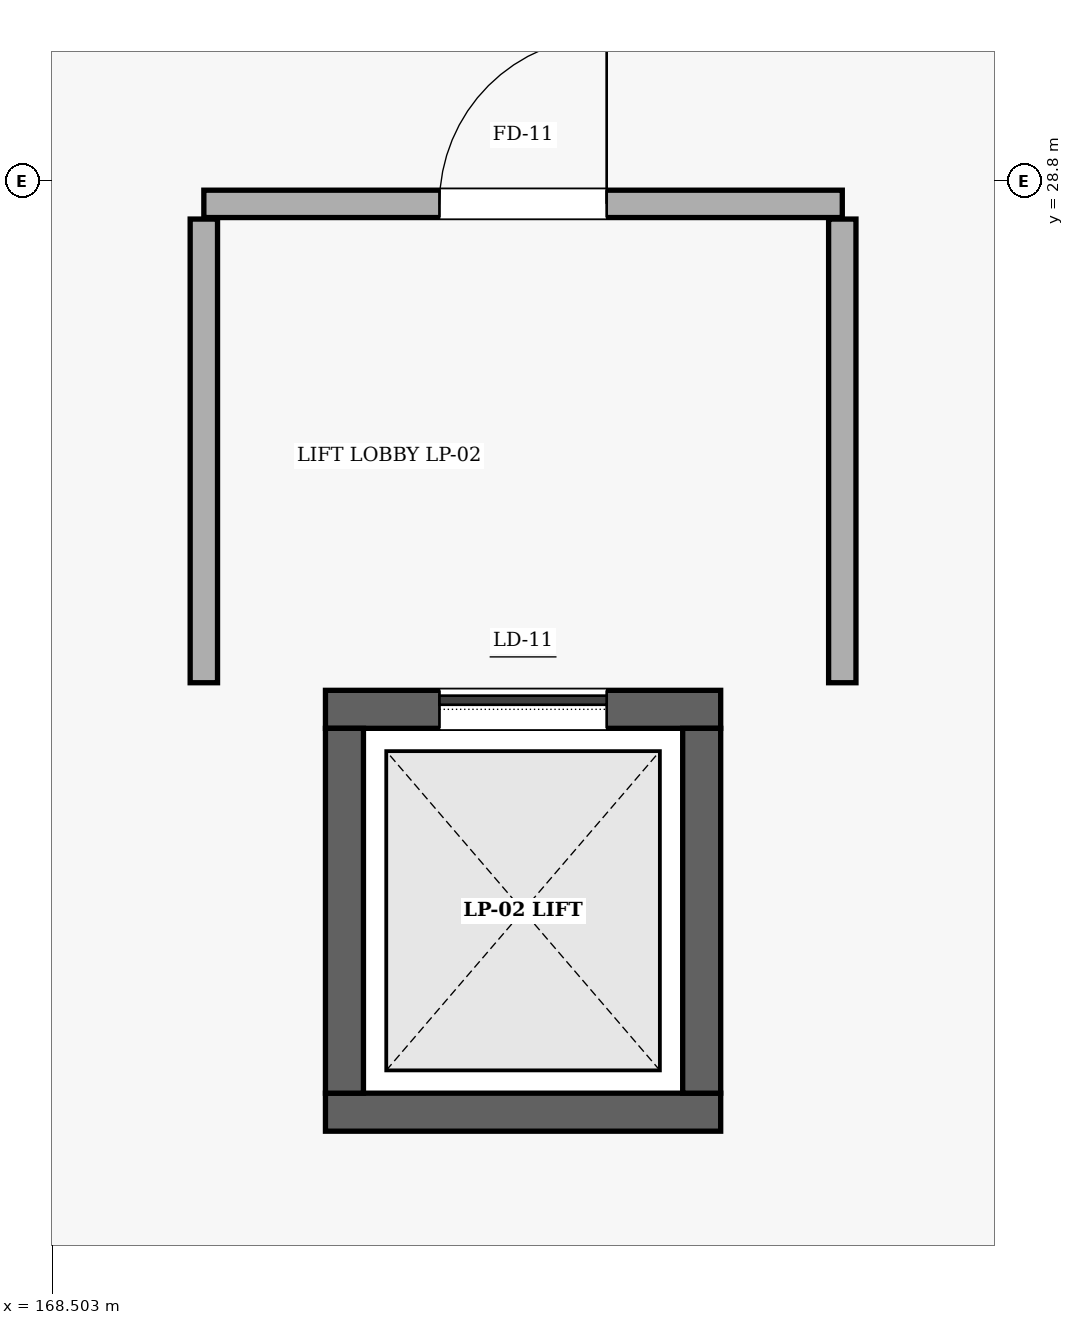
"""IFC4 building model, lengths in metres.
Left out: names, types, materials, properties, quantities, classifications, styles, units other than length and angle.
Written with IfcOpenShell. Run it as: python <this file> out.ifc"""

import sys

from ifc_helpers import new_model, si_unit, direction, frame, frame_2d, origin, place, context, subcontext, project, spatial, rectangle, extrude, element, fill, save


model = new_model("IFC4")
c1 = context("Model", 3, precision=1e-05, world=origin(), true_north=direction((0.0, 1.0)))
c2 = subcontext(c1, "Body", "Model", "MODEL_VIEW")
j1 = project(units=[si_unit("LENGTHUNIT", "METRE"), si_unit("PLANEANGLEUNIT", "RADIAN")], contexts=[c1])
p1 = place(None, origin())
s1 = spatial("IfcSite", under=j1, at=p1, CompositionType="ELEMENT")
p2 = place(p1, origin())
s2 = spatial("IfcBuilding", under=s1, at=p2, CompositionType="ELEMENT")
p3 = place(p2, origin())
s3 = spatial("IfcBuildingStorey", under=s2, at=p3, CompositionType="ELEMENT", Elevation=0.0)
p4 = place(p3, frame((170.3, 22.675, 0.0), z_axis=(0.0, 0.0, 1.0), x_axis=(1.0, 0.0, 0.0)))
e1 = element("IfcWall", 1, at=p4, inside=s3, PredefinedType="SHEAR", context=c2, shape_type="SweptSolid", body=[
    extrude(rectangle(XDim=2.6, YDim=0.25, at=frame_2d((1.3, 0.0))), origin(), (0.0, 0.0, 1.0), 5.12),
])
p5 = place(p3, frame((170.3, 25.325, 0.0), z_axis=(0.0, 0.0, 1.0), x_axis=(1.0, 0.0, 0.0)))
e2 = element("IfcWall", 2, at=p5, inside=s3, PredefinedType="SHEAR", context=c2, shape_type="SweptSolid", body=[
    extrude(rectangle(XDim=2.6, YDim=0.25, at=frame_2d((1.3, 0.0))), origin(), (0.0, 0.0, 1.0), 5.12),
])
p6 = place(p5, frame((0.75, 0.0, 0.0)))
e3 = element("IfcOpeningElement", 3, at=p6, cuts=e2, PredefinedType="OPENING", context=c2, shape_type="SweptSolid", body=[
    extrude(rectangle(XDim=1.1, YDim=2.15, at=frame_2d((0.55, 1.075))), frame((0.0, 0.135, 0.0), z_axis=(0.0, -1.0, 0.0), x_axis=(1.0, 0.0, 0.0)), (0.0, 0.0, 1.0), 0.27),
])
for number, where, z_axis, x_axis in (
    (4, (170.425, 22.8, 0.0), (0.0, 0.0, 1.0), (0.0, 1.0, 0.0)),
    (5, (172.775, 22.8, 0.0), (0.0, 0.0, 1.0), (0.0, 1.0, 0.0)),
):
    element("IfcWall", number, at=place(p3, frame(where, z_axis=z_axis, x_axis=x_axis)), inside=s3, PredefinedType="SHEAR", context=c2, shape_type="SweptSolid", body=[
        extrude(rectangle(XDim=2.4, YDim=0.25, at=frame_2d((1.2, 0.0))), origin(), (0.0, 0.0, 1.0), 5.12),
    ])
p7 = place(p3, frame((169.5, 28.65, 0.0), z_axis=(0.0, 0.0, 1.0), x_axis=(1.0, 0.0, 0.0)))
e6 = element("IfcWall", 6, at=p7, inside=s3, PredefinedType="PARTITIONING", context=c2, shape_type="SweptSolid", body=[
    extrude(rectangle(XDim=4.2, YDim=0.18, at=frame_2d((2.1, 0.0))), origin(), (0.0, 0.0, 1.0), 4.205),
])
p8 = place(p7, frame((1.55, 0.0, 0.0)))
e7 = element("IfcOpeningElement", 7, at=p8, cuts=e6, PredefinedType="OPENING", context=c2, shape_type="SweptSolid", body=[
    extrude(rectangle(XDim=1.1, YDim=2.15, at=frame_2d((0.55, 1.075))), frame((0.0, 0.1, 0.0), z_axis=(0.0, -1.0, 0.0), x_axis=(1.0, 0.0, 0.0)), (0.0, 0.0, 1.0), 0.2),
])
for number, where, z_axis, x_axis in (
    (8, (169.5, 25.5, 0.0), (0.0, 0.0, 1.0), (0.0, 1.0, 0.0)),
    (9, (173.7, 25.5, 0.0), (0.0, 0.0, 1.0), (0.0, 1.0, 0.0)),
):
    element("IfcWall", number, at=place(p3, frame(where, z_axis=z_axis, x_axis=x_axis)), inside=s3, PredefinedType="PARTITIONING", context=c2, shape_type="SweptSolid", body=[
        extrude(rectangle(XDim=3.05, YDim=0.18, at=frame_2d((1.525, 0.0))), origin(), (0.0, 0.0, 1.0), 4.205),
    ])
p9 = place(p6, origin())
e10 = element("IfcDoor", 10, at=p9, inside=s3, OperationType="SLIDING_TO_RIGHT", PredefinedType="DOOR", context=c2, shape_type="SweptSolid", body=[
    extrude(rectangle(XDim=1.1, YDim=2.15, at=frame_2d((0.55, 1.075))), frame((0.0, 0.025, 0.0), z_axis=(0.0, -1.0, 0.0), x_axis=(1.0, 0.0, 0.0)), (0.0, 0.0, 1.0), 0.05),
])
fill(e3, e10)
p10 = place(p8, origin())
e11 = element("IfcDoor", 11, at=p10, inside=s3, OperationType="SINGLE_SWING_RIGHT", PredefinedType="DOOR", context=c2, shape_type="SweptSolid", body=[
    extrude(rectangle(XDim=1.1, YDim=2.15, at=frame_2d((0.55, 1.075))), frame((0.0, 0.025, 0.0), z_axis=(0.0, -1.0, 0.0), x_axis=(1.0, 0.0, 0.0)), (0.0, 0.0, 1.0), 0.05),
])
fill(e7, e11)
save(model, sys.argv[1])
